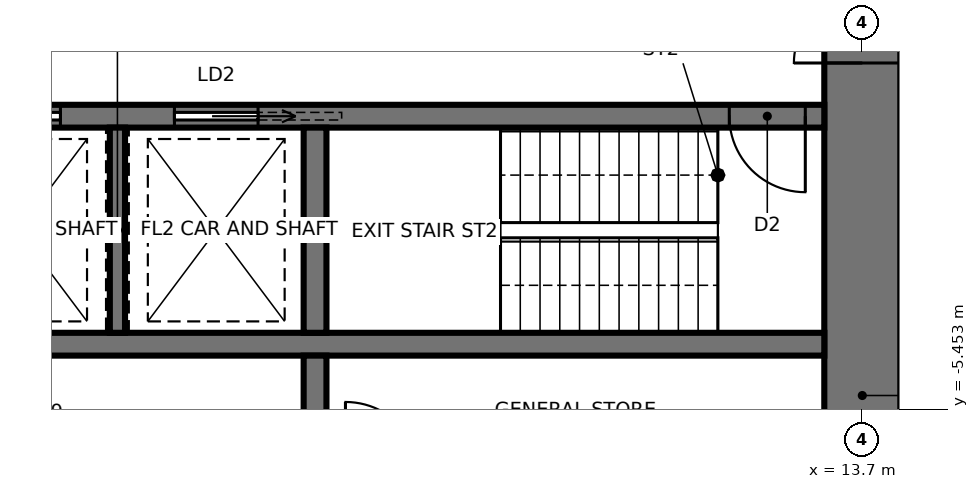
"""IFC4 building model, lengths in metres.
Left out: names, types, materials, properties, quantities, classifications, styles, units other than length and angle.
Written with IfcOpenShell. Run it as: python <this file> out.ifc"""

import sys

from ifc_helpers import new_model, si_unit, direction, frame, frame_2d, origin, place, context, subcontext, project, spatial, rectangle, extrude, element, fill, save


model = new_model("IFC4")
c1 = context("Model", 3, precision=1e-05, world=origin(), true_north=direction((0.0, 1.0)))
c2 = subcontext(c1, "Body", "Model", "MODEL_VIEW")
j1 = project(units=[si_unit("LENGTHUNIT", "METRE"), si_unit("PLANEANGLEUNIT", "RADIAN")], contexts=[c1])
p1 = place(None, origin())
s1 = spatial("IfcSite", under=j1, at=p1, CompositionType="ELEMENT")
p2 = place(p1, origin())
s2 = spatial("IfcBuilding", under=s1, at=p2, CompositionType="ELEMENT")
p3 = place(p2, frame((0.0, 0.0, 264.4)))
s3 = spatial("IfcBuildingStorey", under=s2, at=p3, CompositionType="ELEMENT", Elevation=264.4)
p4 = place(p3, frame((13.7, -9.5, 0.0), z_axis=(0.0, 0.0, 1.0), x_axis=(0.0, 1.0, 0.0)))
e1 = element("IfcWall", 1, at=p4, inside=s3, PredefinedType="SHEAR", context=c2, shape_type="SweptSolid", body=[
    extrude(rectangle(XDim=19.0, YDim=1.0, at=frame_2d((9.5, 0.0))), origin(), (0.0, 0.0, 1.0), 4.2),
])
p5 = place(p4, frame((8.6, 0.0, 0.0)))
e2 = element("IfcOpeningElement", 2, at=p5, cuts=e1, PredefinedType="OPENING", context=c2, shape_type="SweptSolid", body=[
    extrude(rectangle(XDim=1.8, YDim=2.4, at=frame_2d((0.9, 1.2))), frame((0.0, 0.51, 0.0), z_axis=(0.0, -1.0, 0.0), x_axis=(1.0, 0.0, 0.0)), (0.0, 0.0, 1.0), 1.02),
])
p6 = place(p3, frame((-13.2, -1.6, 0.0), z_axis=(0.0, 0.0, 1.0), x_axis=(1.0, 0.0, 0.0)))
e3 = element("IfcWall", 3, at=p6, inside=s3, PredefinedType="SHEAR", context=c2, shape_type="SweptSolid", body=[
    extrude(rectangle(XDim=26.4, YDim=0.3, at=frame_2d((13.2, 0.0))), origin(), (0.0, 0.0, 1.0), 4.2),
])
p7 = place(p6, frame((25.15, 0.0, 0.0)))
e4 = element("IfcOpeningElement", 4, at=p7, cuts=e3, PredefinedType="OPENING", context=c2, shape_type="SweptSolid", body=[
    extrude(rectangle(XDim=1.0, YDim=2.1, at=frame_2d((0.5, 1.05))), frame((0.0, 0.16, 0.0), z_axis=(0.0, -1.0, 0.0), x_axis=(1.0, 0.0, 0.0)), (0.0, 0.0, 1.0), 0.32),
])
p8 = place(p6, frame((6.95, 0.0, 0.0)))
e5 = element("IfcOpeningElement", 5, at=p8, cuts=e3, PredefinedType="OPENING", context=c2, shape_type="SweptSolid", body=[
    extrude(rectangle(XDim=0.9, YDim=2.1, at=frame_2d((0.45, 1.05))), frame((0.0, 0.16, 0.0), z_axis=(0.0, -1.0, 0.0), x_axis=(1.0, 0.0, 0.0)), (0.0, 0.0, 1.0), 0.32),
])
p9 = place(p6, frame((9.55, 0.0, 0.0)))
e6 = element("IfcOpeningElement", 6, at=p9, cuts=e3, PredefinedType="OPENING", context=c2, shape_type="SweptSolid", body=[
    extrude(rectangle(XDim=0.9, YDim=2.1, at=frame_2d((0.45, 1.05))), frame((0.0, 0.16, 0.0), z_axis=(0.0, -1.0, 0.0), x_axis=(1.0, 0.0, 0.0)), (0.0, 0.0, 1.0), 0.32),
])
p10 = place(p6, frame((12.15, 0.0, 0.0)))
e7 = element("IfcOpeningElement", 7, at=p10, cuts=e3, PredefinedType="OPENING", context=c2, shape_type="SweptSolid", body=[
    extrude(rectangle(XDim=0.9, YDim=2.1, at=frame_2d((0.45, 1.05))), frame((0.0, 0.16, 0.0), z_axis=(0.0, -1.0, 0.0), x_axis=(1.0, 0.0, 0.0)), (0.0, 0.0, 1.0), 0.32),
])
p11 = place(p6, frame((15.25, 0.0, 0.0)))
e8 = element("IfcOpeningElement", 8, at=p11, cuts=e3, PredefinedType="OPENING", context=c2, shape_type="SweptSolid", body=[
    extrude(rectangle(XDim=1.1, YDim=2.3, at=frame_2d((0.55, 1.15))), frame((0.0, 0.16, 0.0), z_axis=(0.0, -1.0, 0.0), x_axis=(1.0, 0.0, 0.0)), (0.0, 0.0, 1.0), 0.32),
])
p12 = place(p6, frame((17.85, 0.0, 0.0)))
e9 = element("IfcOpeningElement", 9, at=p12, cuts=e3, PredefinedType="OPENING", context=c2, shape_type="SweptSolid", body=[
    extrude(rectangle(XDim=1.1, YDim=2.3, at=frame_2d((0.55, 1.15))), frame((0.0, 0.16, 0.0), z_axis=(0.0, -1.0, 0.0), x_axis=(1.0, 0.0, 0.0)), (0.0, 0.0, 1.0), 0.32),
])
p13 = place(p6, frame((5.55, 0.0, 0.0)))
e10 = element("IfcOpeningElement", 10, at=p13, cuts=e3, PredefinedType="OPENING", context=c2, shape_type="SweptSolid", body=[
    extrude(rectangle(XDim=0.9, YDim=2.1, at=frame_2d((0.45, 1.05))), frame((0.0, 0.16, 0.0), z_axis=(0.0, -1.0, 0.0), x_axis=(1.0, 0.0, 0.0)), (0.0, 0.0, 1.0), 0.32),
])
p14 = place(p3, frame((-13.2, -4.6, 0.0), z_axis=(0.0, 0.0, 1.0), x_axis=(1.0, 0.0, 0.0)))
e11 = element("IfcWall", 11, at=p14, inside=s3, PredefinedType="SHEAR", context=c2, shape_type="SweptSolid", body=[
    extrude(rectangle(XDim=26.4, YDim=0.3, at=frame_2d((13.2, 0.0))), origin(), (0.0, 0.0, 1.0), 4.2),
])
p15 = place(p3, frame((6.5, -1.75, 0.0), z_axis=(0.0, 0.0, 1.0), x_axis=(0.0, -1.0, 0.0)))
e12 = element("IfcWall", 12, at=p15, inside=s3, PredefinedType="SHEAR", context=c2, shape_type="SweptSolid", body=[
    extrude(rectangle(XDim=2.7, YDim=0.3, at=frame_2d((1.35, 0.0))), origin(), (0.0, 0.0, 1.0), 4.2),
])
p16 = place(p3, frame((6.5, -4.75, 0.0), z_axis=(0.0, 0.0, 1.0), x_axis=(0.0, -1.0, 0.0)))
e13 = element("IfcWall", 13, at=p16, inside=s3, PredefinedType="SHEAR", context=c2, shape_type="SweptSolid", body=[
    extrude(rectangle(XDim=3.75, YDim=0.3, at=frame_2d((1.875, 0.0))), origin(), (0.0, 0.0, 1.0), 4.2),
])
p17 = place(p3, frame((3.9, -1.75, 0.0), z_axis=(0.0, 0.0, 1.0), x_axis=(0.0, -1.0, 0.0)))
e14 = element("IfcWall", 14, at=p17, inside=s3, PredefinedType="SHEAR", context=c2, shape_type="SweptSolid", body=[
    extrude(rectangle(XDim=2.7, YDim=0.2, at=frame_2d((1.35, 0.0))), origin(), (0.0, 0.0, 1.0), 4.2),
])
p18 = place(p5, origin())
e15 = element("IfcDoor", 15, at=p18, inside=s3, OperationType="DOUBLE_DOOR_SINGLE_SWING", PredefinedType="DOOR", context=c2, shape_type="SweptSolid", body=[
    extrude(rectangle(XDim=1.72, YDim=2.36, at=frame_2d((0.9, 1.18))), frame((0.0, 0.025, 0.0), z_axis=(0.0, -1.0, 0.0), x_axis=(1.0, 0.0, 0.0)), (0.0, 0.0, 1.0), 0.05),
    extrude(rectangle(XDim=0.04, YDim=2.4, at=frame_2d((0.02, 1.2))), frame((0.0, 0.25, 0.0), z_axis=(0.0, -1.0, 0.0), x_axis=(1.0, 0.0, 0.0)), (0.0, 0.0, 1.0), 0.5),
    extrude(rectangle(XDim=0.04, YDim=2.4, at=frame_2d((1.78, 1.2))), frame((0.0, 0.25, 0.0), z_axis=(0.0, -1.0, 0.0), x_axis=(1.0, 0.0, 0.0)), (0.0, 0.0, 1.0), 0.5),
    extrude(rectangle(XDim=1.72, YDim=0.04, at=frame_2d((0.9, 2.38))), frame((0.0, 0.25, 0.0), z_axis=(0.0, -1.0, 0.0), x_axis=(1.0, 0.0, 0.0)), (0.0, 0.0, 1.0), 0.5),
])
fill(e2, e15)
p19 = place(p7, frame((1.0, 0.0, 0.0), z_axis=(0.0, 0.0, 1.0), x_axis=(-1.0, 0.0, 0.0)))
e16 = element("IfcDoor", 16, at=p19, inside=s3, OperationType="SINGLE_SWING_LEFT", PredefinedType="DOOR", context=c2, shape_type="SweptSolid", body=[
    extrude(rectangle(XDim=1.0, YDim=2.1, at=frame_2d((0.5, 1.05))), frame((0.0, 0.025, 0.0), z_axis=(0.0, -1.0, 0.0), x_axis=(1.0, 0.0, 0.0)), (0.0, 0.0, 1.0), 0.05),
])
fill(e4, e16)
p20 = place(p11, frame((1.1, 0.0, 0.0), z_axis=(0.0, 0.0, 1.0), x_axis=(-1.0, 0.0, 0.0)))
e17 = element("IfcDoor", 17, at=p20, inside=s3, OperationType="SLIDING_TO_RIGHT", PredefinedType="DOOR", context=c2, shape_type="SweptSolid", body=[
    extrude(rectangle(XDim=1.1, YDim=2.3, at=frame_2d((0.55, 1.15))), frame((0.0, 0.025, 0.0), z_axis=(0.0, -1.0, 0.0), x_axis=(1.0, 0.0, 0.0)), (0.0, 0.0, 1.0), 0.05),
])
fill(e8, e17)
p21 = place(p12, frame((1.1, 0.0, 0.0), z_axis=(0.0, 0.0, 1.0), x_axis=(-1.0, 0.0, 0.0)))
e18 = element("IfcDoor", 18, at=p21, inside=s3, OperationType="SLIDING_TO_LEFT", PredefinedType="DOOR", context=c2, shape_type="SweptSolid", body=[
    extrude(rectangle(XDim=1.1, YDim=2.3, at=frame_2d((0.55, 1.15))), frame((0.0, 0.025, 0.0), z_axis=(0.0, -1.0, 0.0), x_axis=(1.0, 0.0, 0.0)), (0.0, 0.0, 1.0), 0.05),
])
fill(e9, e18)
save(model, sys.argv[1])
